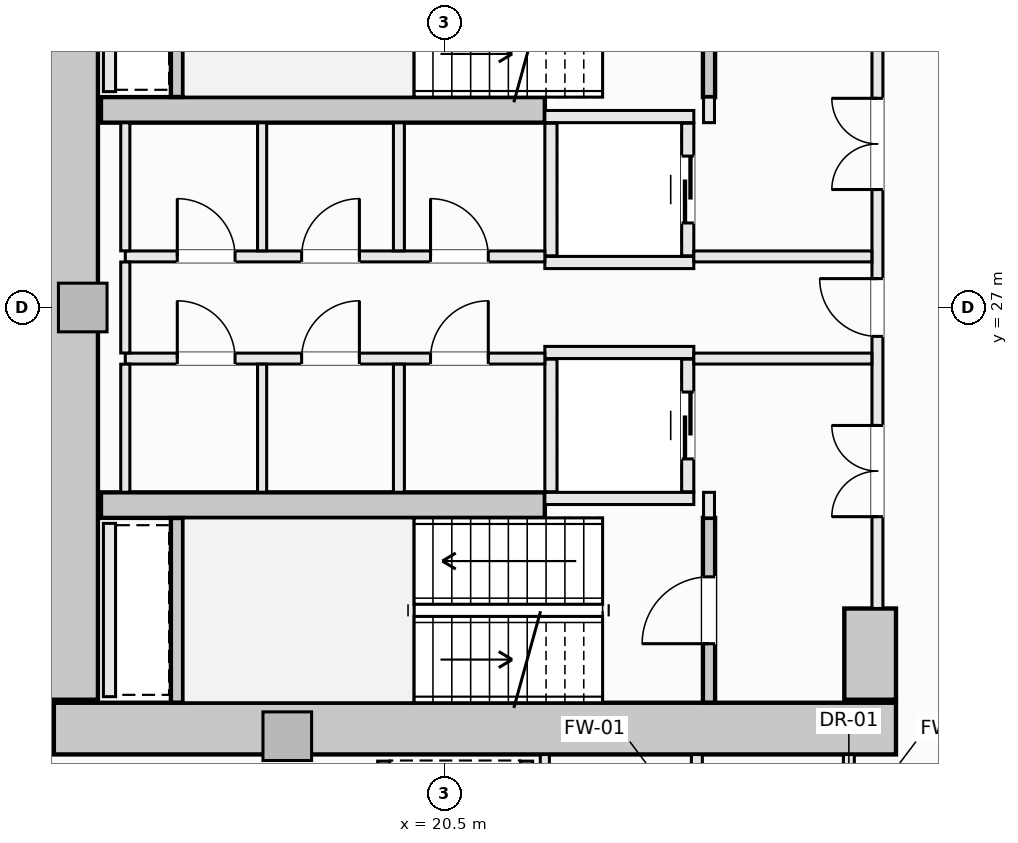
"""IFC4 building model, lengths in metres.
Left out: names, types, materials, properties, quantities, classifications, styles, units other than length and angle.
Written with IfcOpenShell. Run it as: python <this file> out.ifc"""

import sys

from ifc_helpers import new_model, si_unit, direction, frame, frame_2d, origin, origin_2d, place, context, subcontext, project, spatial, rectangle, extrude, element, fill, save


model = new_model("IFC4")
c1 = context("Model", 3, precision=1e-05, world=origin(), true_north=direction((0.0, 1.0)))
c2 = subcontext(c1, "Body", "Model", "MODEL_VIEW")
j1 = project(units=[si_unit("LENGTHUNIT", "METRE"), si_unit("PLANEANGLEUNIT", "RADIAN")], contexts=[c1])
p1 = place(None, origin())
s1 = spatial("IfcSite", under=j1, at=p1, CompositionType="ELEMENT")
p2 = place(p1, origin())
s2 = spatial("IfcBuilding", under=s1, at=p2, CompositionType="ELEMENT")
p3 = place(p2, frame((0.0, 0.0, 65.0)))
s3 = spatial("IfcBuildingStorey", under=s2, at=p3, CompositionType="ELEMENT", Elevation=65.0)
p4 = place(p3, frame((14.075, 20.075, -0.28), z_axis=(0.0, 0.0, 1.0), x_axis=(1.0, 0.0, 0.0)))
e1 = element("IfcWall", 1, at=p4, inside=s3, PredefinedType="SHEAR", context=c2, shape_type="SweptSolid", body=[
    extrude(rectangle(XDim=13.85, YDim=0.85, at=frame_2d((6.925, 0.0))), origin(), (0.0, 0.0, 1.0), 3.85),
])
p5 = place(p3, frame((14.375, 20.55, -0.28), z_axis=(0.0, 0.0, 1.0), x_axis=(0.0, 1.0, 0.0)))
e2 = element("IfcWall", 2, at=p5, inside=s3, PredefinedType="SHEAR", context=c2, shape_type="SweptSolid", body=[
    extrude(rectangle(XDim=12.9, YDim=0.85, at=frame_2d((6.45, 0.0))), origin(), (0.0, 0.0, 1.0), 3.85),
])
p6 = place(p3, frame((27.5, 20.55, -0.28), z_axis=(0.0, 0.0, 1.0), x_axis=(0.0, 1.0, 0.0)))
e3 = element("IfcWall", 3, at=p6, inside=s3, PredefinedType="SHEAR", context=c2, shape_type="SweptSolid", body=[
    extrude(rectangle(XDim=1.5, YDim=0.85, at=frame_2d((0.75, 0.0))), origin(), (0.0, 0.0, 1.0), 3.85),
])
for number, where, z_axis, x_axis in (
    (4, (14.85, 30.25, -0.28), (0.0, 0.0, 1.0), (1.0, 0.0, 0.0)),
    (5, (14.85, 23.75, -0.28), (0.0, 0.0, 1.0), (1.0, 0.0, 0.0)),
):
    element("IfcWall", number, at=place(p3, frame(where, z_axis=z_axis, x_axis=x_axis)), inside=s3, PredefinedType="SHEAR", context=c2, shape_type="SweptSolid", body=[
        extrude(rectangle(XDim=7.3, YDim=0.42, at=frame_2d((3.65, 0.0))), origin(), (0.0, 0.0, 1.0), 3.85),
    ])
for number, where, z_axis, x_axis in (
    (6, (14.55, 27.0, -0.28), (0.0, 0.0, 1.0), (1.0, 0.0, 0.0)),
    (7, (17.914, 19.95, -0.28), (0.0, 0.0, 1.0), (1.0, 0.0, 0.0)),
):
    element("IfcColumn", number, at=place(p3, frame(where, z_axis=z_axis, x_axis=x_axis)), inside=s3, PredefinedType="PILASTER", context=c2, shape_type="SweptSolid", body=[
        extrude(rectangle(XDim=0.8, YDim=0.8, at=origin_2d()), origin(), (0.0, 0.0, 1.0), 3.85),
    ])
p7 = place(p3, frame((24.85, 30.46, -0.28), z_axis=(0.0, 0.0, 1.0), x_axis=(0.0, 1.0, 0.0)))
e8 = element("IfcWall", 8, at=p7, inside=s3, PredefinedType="SHEAR", context=c2, shape_type="SweptSolid", body=[
    extrude(rectangle(XDim=3.038, YDim=0.2, at=frame_2d((1.519, 0.0))), origin(), (0.0, 0.0, 1.0), 3.85),
])
p8 = place(p7, frame((0.969, 0.0, 0.28)))
e9 = element("IfcOpeningElement", 9, at=p8, cuts=e8, PredefinedType="OPENING", context=c2, shape_type="SweptSolid", body=[
    extrude(rectangle(XDim=1.1, YDim=2.15, at=frame_2d((0.55, 1.075))), frame((0.0, 0.11, 0.0), z_axis=(0.0, -1.0, 0.0), x_axis=(1.0, 0.0, 0.0)), (0.0, 0.0, 1.0), 0.22),
])
p9 = place(p3, frame((16.1, 30.462, -0.28), z_axis=(0.0, 0.0, 1.0), x_axis=(0.0, 1.0, 0.0)))
e10 = element("IfcWall", 10, at=p9, inside=s3, PredefinedType="SHEAR", context=c2, shape_type="SweptSolid", body=[
    extrude(rectangle(XDim=3.036, YDim=0.2, at=frame_2d((1.518, 0.0))), origin(), (0.0, 0.0, 1.0), 3.85),
])
p10 = place(p3, frame((24.85, 20.502, -0.28), z_axis=(0.0, 0.0, 1.0), x_axis=(0.0, 1.0, 0.0)))
e11 = element("IfcWall", 11, at=p10, inside=s3, PredefinedType="SHEAR", context=c2, shape_type="SweptSolid", body=[
    extrude(rectangle(XDim=3.038, YDim=0.2, at=frame_2d((1.519, 0.0))), origin(), (0.0, 0.0, 1.0), 3.85),
])
p11 = place(p10, frame((0.969, 0.0, 0.28)))
e12 = element("IfcOpeningElement", 12, at=p11, cuts=e11, PredefinedType="OPENING", context=c2, shape_type="SweptSolid", body=[
    extrude(rectangle(XDim=1.1, YDim=2.15, at=frame_2d((0.55, 1.075))), frame((0.0, 0.11, 0.0), z_axis=(0.0, -1.0, 0.0), x_axis=(1.0, 0.0, 0.0)), (0.0, 0.0, 1.0), 0.22),
])
p12 = place(p3, frame((16.1, 20.502, -0.28), z_axis=(0.0, 0.0, 1.0), x_axis=(0.0, 1.0, 0.0)))
e13 = element("IfcWall", 13, at=p12, inside=s3, PredefinedType="SHEAR", context=c2, shape_type="SweptSolid", body=[
    extrude(rectangle(XDim=3.036, YDim=0.2, at=frame_2d((1.518, 0.0))), origin(), (0.0, 0.0, 1.0), 3.85),
])
for number, where, z_axis, x_axis in (
    (14, (22.15, 30.14, 0.0), (0.0, 0.0, 1.0), (1.0, 0.0, 0.0)),
    (15, (22.15, 27.74, 0.0), (0.0, 0.0, 1.0), (1.0, 0.0, 0.0)),
):
    element("IfcWall", number, at=place(p3, frame(where, z_axis=z_axis, x_axis=x_axis)), inside=s3, PredefinedType="SOLIDWALL", context=c2, shape_type="SweptSolid", body=[
        extrude(rectangle(XDim=2.45, YDim=0.2, at=frame_2d((1.225, 0.0))), origin(), (0.0, 0.0, 1.0), 3.57),
    ])
p13 = place(p3, frame((22.25, 27.85, 0.0), z_axis=(0.0, 0.0, 1.0), x_axis=(0.0, 1.0, 0.0)))
e16 = element("IfcWall", 16, at=p13, inside=s3, PredefinedType="SOLIDWALL", context=c2, shape_type="SweptSolid", body=[
    extrude(rectangle(XDim=2.18, YDim=0.2, at=frame_2d((1.09, 0.0))), origin(), (0.0, 0.0, 1.0), 3.57),
])
p14 = place(p3, frame((24.5, 27.85, 0.0), z_axis=(0.0, 0.0, 1.0), x_axis=(0.0, 1.0, 0.0)))
e17 = element("IfcWall", 17, at=p14, inside=s3, PredefinedType="SOLIDWALL", context=c2, shape_type="SweptSolid", body=[
    extrude(rectangle(XDim=2.18, YDim=0.2, at=frame_2d((1.09, 0.0))), origin(), (0.0, 0.0, 1.0), 3.57),
])
p15 = place(p14, frame((0.54, 0.0, 0.0)))
e18 = element("IfcOpeningElement", 18, at=p15, cuts=e17, PredefinedType="OPENING", context=c2, shape_type="SweptSolid", body=[
    extrude(rectangle(XDim=1.1, YDim=2.2, at=frame_2d((0.55, 1.1))), frame((0.0, 0.11, 0.0), z_axis=(0.0, -1.0, 0.0), x_axis=(1.0, 0.0, 0.0)), (0.0, 0.0, 1.0), 0.22),
])
for number, where, z_axis, x_axis in (
    (19, (22.15, 26.26, 0.0), (0.0, 0.0, 1.0), (1.0, 0.0, 0.0)),
    (20, (22.15, 23.86, 0.0), (0.0, 0.0, 1.0), (1.0, 0.0, 0.0)),
):
    element("IfcWall", number, at=place(p3, frame(where, z_axis=z_axis, x_axis=x_axis)), inside=s3, PredefinedType="SOLIDWALL", context=c2, shape_type="SweptSolid", body=[
        extrude(rectangle(XDim=2.45, YDim=0.2, at=frame_2d((1.225, 0.0))), origin(), (0.0, 0.0, 1.0), 3.57),
    ])
p16 = place(p3, frame((22.25, 23.97, 0.0), z_axis=(0.0, 0.0, 1.0), x_axis=(0.0, 1.0, 0.0)))
e21 = element("IfcWall", 21, at=p16, inside=s3, PredefinedType="SOLIDWALL", context=c2, shape_type="SweptSolid", body=[
    extrude(rectangle(XDim=2.18, YDim=0.2, at=frame_2d((1.09, 0.0))), origin(), (0.0, 0.0, 1.0), 3.57),
])
p17 = place(p3, frame((24.5, 23.97, 0.0), z_axis=(0.0, 0.0, 1.0), x_axis=(0.0, 1.0, 0.0)))
e22 = element("IfcWall", 22, at=p17, inside=s3, PredefinedType="SOLIDWALL", context=c2, shape_type="SweptSolid", body=[
    extrude(rectangle(XDim=2.18, YDim=0.2, at=frame_2d((1.09, 0.0))), origin(), (0.0, 0.0, 1.0), 3.57),
])
p18 = place(p17, frame((0.54, 0.0, 0.0)))
e23 = element("IfcOpeningElement", 23, at=p18, cuts=e22, PredefinedType="OPENING", context=c2, shape_type="SweptSolid", body=[
    extrude(rectangle(XDim=1.1, YDim=2.2, at=frame_2d((0.55, 1.1))), frame((0.0, 0.11, 0.0), z_axis=(0.0, -1.0, 0.0), x_axis=(1.0, 0.0, 0.0)), (0.0, 0.0, 1.0), 0.22),
])
for number, where, z_axis, x_axis in (
    (24, (19.5, 17.01, 0.0), (0.0, 0.0, 1.0), (0.0, 1.0, 0.0)),
    (25, (21.85, 17.01, 0.0), (0.0, 0.0, 1.0), (0.0, 1.0, 0.0)),
):
    element("IfcWall", number, at=place(p3, frame(where, z_axis=z_axis, x_axis=x_axis)), inside=s3, PredefinedType="SOLIDWALL", context=c2, shape_type="SweptSolid", body=[
        extrude(rectangle(XDim=2.53, YDim=0.2, at=frame_2d((1.265, 0.0))), origin(), (0.0, 0.0, 1.0), 3.57),
    ])
for number, where, z_axis, x_axis in (
    (26, (14.99, 30.55, 0.0), (0.0, 0.0, 1.0), (0.0, 1.0, 0.0)),
    (27, (14.99, 20.6, 0.0), (0.0, 0.0, 1.0), (0.0, 1.0, 0.0)),
):
    element("IfcWall", number, at=place(p3, frame(where, z_axis=z_axis, x_axis=x_axis)), inside=s3, PredefinedType="SOLIDWALL", context=c2, shape_type="SweptSolid", body=[
        extrude(rectangle(XDim=2.85, YDim=0.2, at=frame_2d((1.425, 0.0))), origin(), (0.0, 0.0, 1.0), 3.57),
    ])
for number, where, z_axis, x_axis in (
    (28, (24.85, 23.54, 0.0), (0.0, 0.0, 1.0), (0.0, 1.0, 0.0)),
    (29, (24.85, 30.04, 0.0), (0.0, 0.0, 1.0), (0.0, 1.0, 0.0)),
):
    element("IfcWall", number, at=place(p3, frame(where, z_axis=z_axis, x_axis=x_axis)), inside=s3, PredefinedType="SOLIDWALL", context=c2, shape_type="SweptSolid", body=[
        extrude(rectangle(XDim=0.42, YDim=0.18, at=frame_2d((0.21, 0.0))), origin(), (0.0, 0.0, 1.0), 3.57),
    ])
p19 = place(p3, frame((27.62, 22.05, 0.0), z_axis=(0.0, 0.0, 1.0), x_axis=(0.0, 1.0, 0.0)))
e30 = element("IfcWall", 30, at=p19, inside=s3, PredefinedType="SOLIDWALL", context=c2, shape_type="SweptSolid", body=[
    extrude(rectangle(XDim=9.9, YDim=0.18, at=frame_2d((4.95, 0.0))), origin(), (0.0, 0.0, 1.0), 2.662),
])
p20 = place(p19, frame((4.475, 0.0, 0.0)))
e31 = element("IfcOpeningElement", 31, at=p20, cuts=e30, PredefinedType="OPENING", context=c2, shape_type="SweptSolid", body=[
    extrude(rectangle(XDim=0.95, YDim=2.1, at=frame_2d((0.475, 1.05))), frame((0.0, 0.1, 0.0), z_axis=(0.0, -1.0, 0.0), x_axis=(1.0, 0.0, 0.0)), (0.0, 0.0, 1.0), 0.2),
])
p21 = place(p19, frame((6.89, 0.0, 0.0)))
e32 = element("IfcOpeningElement", 32, at=p21, cuts=e30, PredefinedType="OPENING", context=c2, shape_type="SweptSolid", body=[
    extrude(rectangle(XDim=1.5, YDim=2.2, at=frame_2d((0.75, 1.1))), frame((0.0, 0.1, 0.0), z_axis=(0.0, -1.0, 0.0), x_axis=(1.0, 0.0, 0.0)), (0.0, 0.0, 1.0), 0.2),
])
p22 = place(p19, frame((1.51, 0.0, 0.0)))
e33 = element("IfcOpeningElement", 33, at=p22, cuts=e30, PredefinedType="OPENING", context=c2, shape_type="SweptSolid", body=[
    extrude(rectangle(XDim=1.5, YDim=2.2, at=frame_2d((0.75, 1.1))), frame((0.0, 0.1, 0.0), z_axis=(0.0, -1.0, 0.0), x_axis=(1.0, 0.0, 0.0)), (0.0, 0.0, 1.0), 0.2),
])
p23 = place(p3, frame((15.25, 27.84, 0.0), z_axis=(0.0, 0.0, 1.0), x_axis=(1.0, 0.0, 0.0)))
e34 = element("IfcWall", 34, at=p23, inside=s3, PredefinedType="SOLIDWALL", context=c2, shape_type="SweptSolid", body=[
    extrude(rectangle(XDim=6.9, YDim=0.18, at=frame_2d((3.45, 0.0))), origin(), (0.0, 0.0, 1.0), 3.57),
])
p24 = place(p23, frame((5.02, 0.0, 0.0)))
e35 = element("IfcOpeningElement", 35, at=p24, cuts=e34, PredefinedType="OPENING", context=c2, shape_type="SweptSolid", body=[
    extrude(rectangle(XDim=0.95, YDim=2.1, at=frame_2d((0.475, 1.05))), frame((0.0, 0.1, 0.0), z_axis=(0.0, -1.0, 0.0), x_axis=(1.0, 0.0, 0.0)), (0.0, 0.0, 1.0), 0.2),
])
p25 = place(p23, frame((0.855, 0.0, 0.0)))
e36 = element("IfcOpeningElement", 36, at=p25, cuts=e34, PredefinedType="OPENING", context=c2, shape_type="SweptSolid", body=[
    extrude(rectangle(XDim=0.95, YDim=2.1, at=frame_2d((0.475, 1.05))), frame((0.0, 0.1, 0.0), z_axis=(0.0, -1.0, 0.0), x_axis=(1.0, 0.0, 0.0)), (0.0, 0.0, 1.0), 0.2),
])
p26 = place(p23, frame((2.9, 0.0, 0.0)))
e37 = element("IfcOpeningElement", 37, at=p26, cuts=e34, PredefinedType="OPENING", context=c2, shape_type="SweptSolid", body=[
    extrude(rectangle(XDim=0.95, YDim=2.1, at=frame_2d((0.475, 1.05))), frame((0.0, 0.1, 0.0), z_axis=(0.0, -1.0, 0.0), x_axis=(1.0, 0.0, 0.0)), (0.0, 0.0, 1.0), 0.2),
])
p27 = place(p3, frame((24.6, 27.84, 0.0), z_axis=(0.0, 0.0, 1.0), x_axis=(1.0, 0.0, 0.0)))
e38 = element("IfcWall", 38, at=p27, inside=s3, PredefinedType="SOLIDWALL", context=c2, shape_type="SweptSolid", body=[
    extrude(rectangle(XDim=2.928, YDim=0.18, at=frame_2d((1.464, 0.0))), origin(), (0.0, 0.0, 1.0), 3.57),
])
p28 = place(p3, frame((15.25, 26.16, 0.0), z_axis=(0.0, 0.0, 1.0), x_axis=(1.0, 0.0, 0.0)))
e39 = element("IfcWall", 39, at=p28, inside=s3, PredefinedType="SOLIDWALL", context=c2, shape_type="SweptSolid", body=[
    extrude(rectangle(XDim=6.9, YDim=0.18, at=frame_2d((3.45, 0.0))), origin(), (0.0, 0.0, 1.0), 3.57),
])
p29 = place(p28, frame((5.02, 0.0, 0.0)))
e40 = element("IfcOpeningElement", 40, at=p29, cuts=e39, PredefinedType="OPENING", context=c2, shape_type="SweptSolid", body=[
    extrude(rectangle(XDim=0.95, YDim=2.1, at=frame_2d((0.475, 1.05))), frame((0.0, 0.1, 0.0), z_axis=(0.0, -1.0, 0.0), x_axis=(1.0, 0.0, 0.0)), (0.0, 0.0, 1.0), 0.2),
])
p30 = place(p28, frame((0.855, 0.0, 0.0)))
e41 = element("IfcOpeningElement", 41, at=p30, cuts=e39, PredefinedType="OPENING", context=c2, shape_type="SweptSolid", body=[
    extrude(rectangle(XDim=0.95, YDim=2.1, at=frame_2d((0.475, 1.05))), frame((0.0, 0.1, 0.0), z_axis=(0.0, -1.0, 0.0), x_axis=(1.0, 0.0, 0.0)), (0.0, 0.0, 1.0), 0.2),
])
p31 = place(p28, frame((2.9, 0.0, 0.0)))
e42 = element("IfcOpeningElement", 42, at=p31, cuts=e39, PredefinedType="OPENING", context=c2, shape_type="SweptSolid", body=[
    extrude(rectangle(XDim=0.95, YDim=2.1, at=frame_2d((0.475, 1.05))), frame((0.0, 0.1, 0.0), z_axis=(0.0, -1.0, 0.0), x_axis=(1.0, 0.0, 0.0)), (0.0, 0.0, 1.0), 0.2),
])
p32 = place(p3, frame((24.6, 26.16, 0.0), z_axis=(0.0, 0.0, 1.0), x_axis=(1.0, 0.0, 0.0)))
e43 = element("IfcWall", 43, at=p32, inside=s3, PredefinedType="SOLIDWALL", context=c2, shape_type="SweptSolid", body=[
    extrude(rectangle(XDim=2.928, YDim=0.18, at=frame_2d((1.464, 0.0))), origin(), (0.0, 0.0, 1.0), 3.57),
])
p33 = place(p3, frame((15.25, 23.962, 0.0), z_axis=(0.0, 0.0, 1.0), x_axis=(0.0, 1.0, 0.0)))
e44 = element("IfcWall", 44, at=p33, inside=s3, PredefinedType="PARTITIONING", context=c2, shape_type="SweptSolid", body=[
    extrude(rectangle(XDim=2.106, YDim=0.15, at=frame_2d((1.053, 0.0))), origin(), (0.0, 0.0, 1.0), 3.57),
])
p34 = place(p3, frame((15.25, 26.252, 0.0), z_axis=(0.0, 0.0, 1.0), x_axis=(0.0, 1.0, 0.0)))
e45 = element("IfcWall", 45, at=p34, inside=s3, PredefinedType="PARTITIONING", context=c2, shape_type="SweptSolid", body=[
    extrude(rectangle(XDim=1.496, YDim=0.15, at=frame_2d((0.748, 0.0))), origin(), (0.0, 0.0, 1.0), 3.57),
])
p35 = place(p3, frame((15.25, 27.932, 0.0), z_axis=(0.0, 0.0, 1.0), x_axis=(0.0, 1.0, 0.0)))
e46 = element("IfcWall", 46, at=p35, inside=s3, PredefinedType="PARTITIONING", context=c2, shape_type="SweptSolid", body=[
    extrude(rectangle(XDim=2.106, YDim=0.15, at=frame_2d((1.053, 0.0))), origin(), (0.0, 0.0, 1.0), 3.57),
])
for number, where, z_axis, x_axis in (
    (47, (19.75, 23.962, 0.0), (0.0, 0.0, 1.0), (0.0, 1.0, 0.0)),
    (48, (19.75, 27.932, 0.0), (0.0, 0.0, 1.0), (0.0, 1.0, 0.0)),
):
    element("IfcWall", number, at=place(p3, frame(where, z_axis=z_axis, x_axis=x_axis)), inside=s3, PredefinedType="SOLIDWALL", context=c2, shape_type="SweptSolid", body=[
        extrude(rectangle(XDim=2.106, YDim=0.18, at=frame_2d((1.053, 0.0))), origin(), (0.0, 0.0, 1.0), 3.57),
    ])
for number, where, z_axis, x_axis in (
    (49, (17.5, 23.962, 0.0), (0.0, 0.0, 1.0), (0.0, 1.0, 0.0)),
    (50, (17.5, 27.932, 0.0), (0.0, 0.0, 1.0), (0.0, 1.0, 0.0)),
):
    element("IfcWall", number, at=place(p3, frame(where, z_axis=z_axis, x_axis=x_axis)), inside=s3, PredefinedType="PARTITIONING", context=c2, shape_type="SweptSolid", body=[
        extrude(rectangle(XDim=2.106, YDim=0.15, at=frame_2d((1.053, 0.0))), origin(), (0.0, 0.0, 1.0), 3.57),
    ])
p36 = place(p3, frame((22.15, 17.142, 0.0), z_axis=(0.0, 0.0, 1.0), x_axis=(0.0, 1.0, 0.0)))
e51 = element("IfcWall", 51, at=p36, inside=s3, PredefinedType="PARTITIONING", context=c2, shape_type="SweptSolid", body=[
    extrude(rectangle(XDim=2.506, YDim=0.15, at=frame_2d((1.253, 0.0))), origin(), (0.0, 0.0, 1.0), 3.57),
])
p37 = place(p3, frame((24.65, 17.142, 0.0), z_axis=(0.0, 0.0, 1.0), x_axis=(0.0, 1.0, 0.0)))
e52 = element("IfcWall", 52, at=p37, inside=s3, PredefinedType="SOLIDWALL", context=c2, shape_type="SweptSolid", body=[
    extrude(rectangle(XDim=2.506, YDim=0.18, at=frame_2d((1.253, 0.0))), origin(), (0.0, 0.0, 1.0), 3.57),
])
p38 = place(p37, frame((0.778, 0.0, 0.0)))
e53 = element("IfcOpeningElement", 53, at=p38, cuts=e52, PredefinedType="OPENING", context=c2, shape_type="SweptSolid", body=[
    extrude(rectangle(XDim=0.95, YDim=2.1, at=frame_2d((0.475, 1.05))), frame((0.0, 0.1, 0.0), z_axis=(0.0, -1.0, 0.0), x_axis=(1.0, 0.0, 0.0)), (0.0, 0.0, 1.0), 0.2),
])
p39 = place(p3, frame((27.15, 17.142, 0.0), z_axis=(0.0, 0.0, 1.0), x_axis=(0.0, 1.0, 0.0)))
e54 = element("IfcWall", 54, at=p39, inside=s3, PredefinedType="SOLIDWALL", context=c2, shape_type="SweptSolid", body=[
    extrude(rectangle(XDim=2.506, YDim=0.18, at=frame_2d((1.253, 0.0))), origin(), (0.0, 0.0, 1.0), 3.57),
])
p40 = place(p39, frame((0.778, 0.0, 0.0)))
e55 = element("IfcOpeningElement", 55, at=p40, cuts=e54, PredefinedType="OPENING", context=c2, shape_type="SweptSolid", body=[
    extrude(rectangle(XDim=0.95, YDim=2.1, at=frame_2d((0.475, 1.05))), frame((0.0, 0.1, 0.0), z_axis=(0.0, -1.0, 0.0), x_axis=(1.0, 0.0, 0.0)), (0.0, 0.0, 1.0), 0.2),
])
p41 = place(p11, origin())
e56 = element("IfcDoor", 56, at=p41, inside=s3, OperationType="SINGLE_SWING_LEFT", PredefinedType="DOOR", context=c2, shape_type="SweptSolid", body=[
    extrude(rectangle(XDim=1.1, YDim=2.15, at=frame_2d((0.55, 1.075))), frame((0.0, 0.025, 0.0), z_axis=(0.0, -1.0, 0.0), x_axis=(1.0, 0.0, 0.0)), (0.0, 0.0, 1.0), 0.05),
])
fill(e12, e56)
p42 = place(p15, origin())
e57 = element("IfcDoor", 57, at=p42, inside=s3, OperationType="SLIDING_TO_LEFT", PredefinedType="DOOR", context=c2, shape_type="SweptSolid", body=[
    extrude(rectangle(XDim=1.1, YDim=2.2, at=frame_2d((0.55, 1.1))), frame((0.0, 0.025, 0.0), z_axis=(0.0, -1.0, 0.0), x_axis=(1.0, 0.0, 0.0)), (0.0, 0.0, 1.0), 0.05),
])
fill(e18, e57)
p43 = place(p18, origin())
e58 = element("IfcDoor", 58, at=p43, inside=s3, OperationType="SLIDING_TO_LEFT", PredefinedType="DOOR", context=c2, shape_type="SweptSolid", body=[
    extrude(rectangle(XDim=1.1, YDim=2.2, at=frame_2d((0.55, 1.1))), frame((0.0, 0.025, 0.0), z_axis=(0.0, -1.0, 0.0), x_axis=(1.0, 0.0, 0.0)), (0.0, 0.0, 1.0), 0.05),
])
fill(e23, e58)
p44 = place(p20, origin())
e59 = element("IfcDoor", 59, at=p44, inside=s3, OperationType="SINGLE_SWING_RIGHT", PredefinedType="DOOR", context=c2, shape_type="SweptSolid", body=[
    extrude(rectangle(XDim=0.95, YDim=2.1, at=frame_2d((0.475, 1.05))), frame((0.0, 0.025, 0.0), z_axis=(0.0, -1.0, 0.0), x_axis=(1.0, 0.0, 0.0)), (0.0, 0.0, 1.0), 0.05),
])
fill(e31, e59)
p45 = place(p21, origin())
e60 = element("IfcDoor", 60, at=p45, inside=s3, OperationType="DOUBLE_DOOR_SINGLE_SWING", PredefinedType="DOOR", context=c2, shape_type="SweptSolid", body=[
    extrude(rectangle(XDim=1.5, YDim=2.2, at=frame_2d((0.75, 1.1))), frame((0.0, 0.025, 0.0), z_axis=(0.0, -1.0, 0.0), x_axis=(1.0, 0.0, 0.0)), (0.0, 0.0, 1.0), 0.05),
])
fill(e32, e60)
p46 = place(p22, origin())
e61 = element("IfcDoor", 61, at=p46, inside=s3, OperationType="DOUBLE_DOOR_SINGLE_SWING", PredefinedType="DOOR", context=c2, shape_type="SweptSolid", body=[
    extrude(rectangle(XDim=1.5, YDim=2.2, at=frame_2d((0.75, 1.1))), frame((0.0, 0.025, 0.0), z_axis=(0.0, -1.0, 0.0), x_axis=(1.0, 0.0, 0.0)), (0.0, 0.0, 1.0), 0.05),
])
fill(e33, e61)
p47 = place(p24, origin())
e62 = element("IfcDoor", 62, at=p47, inside=s3, OperationType="SINGLE_SWING_LEFT", PredefinedType="DOOR", context=c2, shape_type="SweptSolid", body=[
    extrude(rectangle(XDim=0.95, YDim=2.1, at=frame_2d((0.475, 1.05))), frame((0.0, 0.025, 0.0), z_axis=(0.0, -1.0, 0.0), x_axis=(1.0, 0.0, 0.0)), (0.0, 0.0, 1.0), 0.05),
])
fill(e35, e62)
p48 = place(p29, origin())
e63 = element("IfcDoor", 63, at=p48, inside=s3, OperationType="SINGLE_SWING_RIGHT", PredefinedType="DOOR", context=c2, shape_type="SweptSolid", body=[
    extrude(rectangle(XDim=0.95, YDim=2.1, at=frame_2d((0.475, 1.05))), frame((0.0, 0.025, 0.0), z_axis=(0.0, -1.0, 0.0), x_axis=(1.0, 0.0, 0.0)), (0.0, 0.0, 1.0), 0.05),
])
fill(e40, e63)
p49 = place(p25, origin())
e64 = element("IfcDoor", 64, at=p49, inside=s3, OperationType="SINGLE_SWING_LEFT", PredefinedType="DOOR", context=c2, shape_type="SweptSolid", body=[
    extrude(rectangle(XDim=0.95, YDim=2.1, at=frame_2d((0.475, 1.05))), frame((0.0, 0.025, 0.0), z_axis=(0.0, -1.0, 0.0), x_axis=(1.0, 0.0, 0.0)), (0.0, 0.0, 1.0), 0.05),
])
fill(e36, e64)
p50 = place(p26, origin())
e65 = element("IfcDoor", 65, at=p50, inside=s3, OperationType="SINGLE_SWING_RIGHT", PredefinedType="DOOR", context=c2, shape_type="SweptSolid", body=[
    extrude(rectangle(XDim=0.95, YDim=2.1, at=frame_2d((0.475, 1.05))), frame((0.0, 0.025, 0.0), z_axis=(0.0, -1.0, 0.0), x_axis=(1.0, 0.0, 0.0)), (0.0, 0.0, 1.0), 0.05),
])
fill(e37, e65)
p51 = place(p30, origin())
e66 = element("IfcDoor", 66, at=p51, inside=s3, OperationType="SINGLE_SWING_LEFT", PredefinedType="DOOR", context=c2, shape_type="SweptSolid", body=[
    extrude(rectangle(XDim=0.95, YDim=2.1, at=frame_2d((0.475, 1.05))), frame((0.0, 0.025, 0.0), z_axis=(0.0, -1.0, 0.0), x_axis=(1.0, 0.0, 0.0)), (0.0, 0.0, 1.0), 0.05),
])
fill(e41, e66)
p52 = place(p31, origin())
e67 = element("IfcDoor", 67, at=p52, inside=s3, OperationType="SINGLE_SWING_RIGHT", PredefinedType="DOOR", context=c2, shape_type="SweptSolid", body=[
    extrude(rectangle(XDim=0.95, YDim=2.1, at=frame_2d((0.475, 1.05))), frame((0.0, 0.025, 0.0), z_axis=(0.0, -1.0, 0.0), x_axis=(1.0, 0.0, 0.0)), (0.0, 0.0, 1.0), 0.05),
])
fill(e42, e67)
save(model, sys.argv[1])
